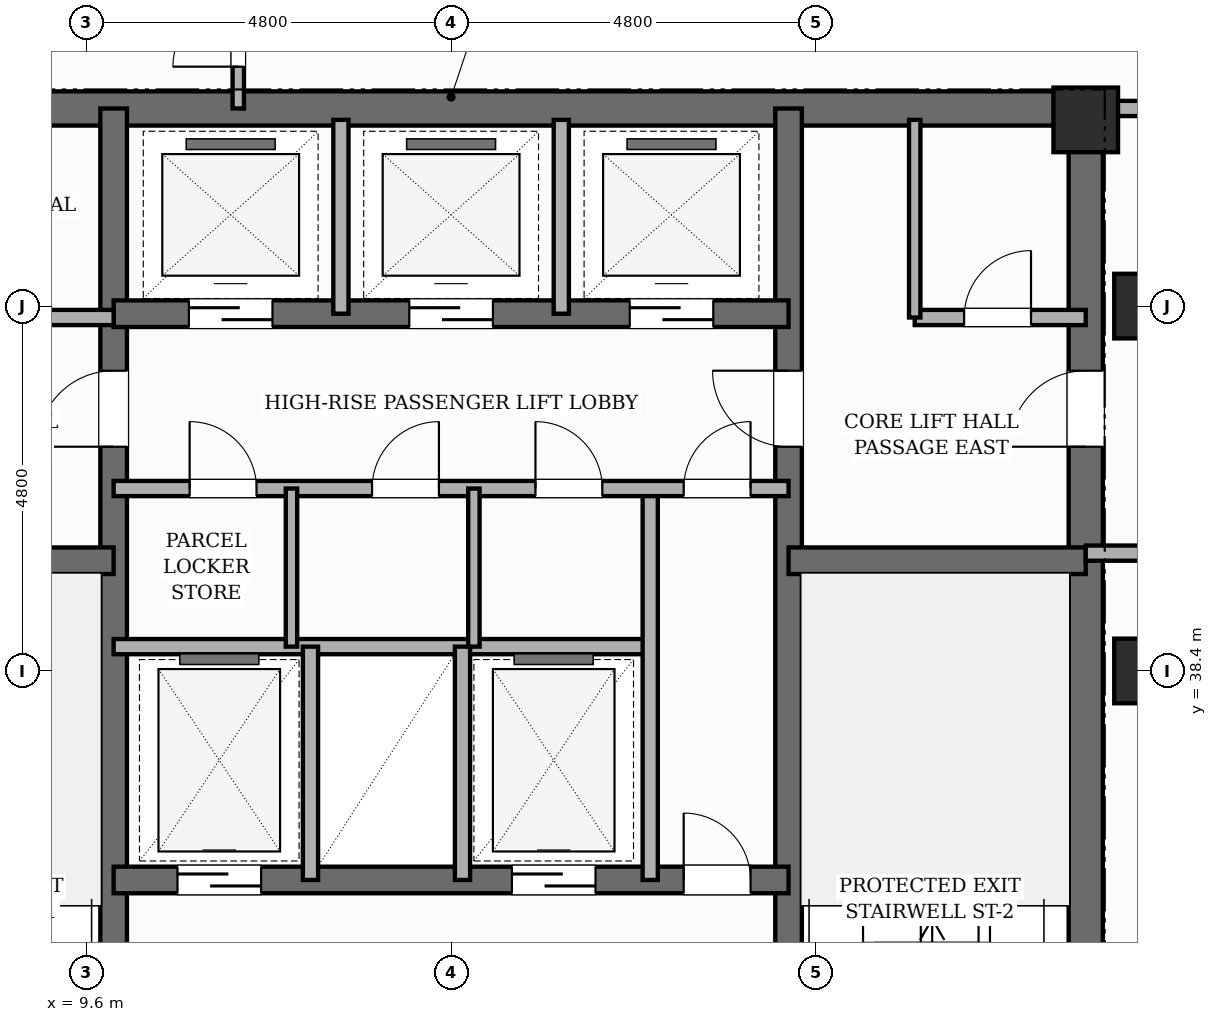
"""IFC4 building model, lengths in metres.
Left out: names, types, materials, properties, quantities, classifications, styles, units other than length and angle.
Written with IfcOpenShell. Run it as: python <this file> out.ifc"""

import sys

from ifc_helpers import new_model, si_unit, direction, frame, frame_2d, origin, origin_2d, place, context, subcontext, project, spatial, rectangle, extrude, element, fill, save


model = new_model("IFC4")
c1 = context("Model", 3, precision=1e-05, world=origin(), true_north=direction((0.0, 1.0)))
c2 = subcontext(c1, "Body", "Model", "MODEL_VIEW")
j1 = project(units=[si_unit("LENGTHUNIT", "METRE"), si_unit("PLANEANGLEUNIT", "RADIAN")], contexts=[c1])
p1 = place(None, origin())
s1 = spatial("IfcSite", under=j1, at=p1, CompositionType="ELEMENT")
p2 = place(p1, origin())
s2 = spatial("IfcBuilding", under=s1, at=p2, CompositionType="ELEMENT")
p3 = place(p2, frame((0.0, 0.0, 207.4)))
s3 = spatial("IfcBuildingStorey", under=s2, at=p3, CompositionType="ELEMENT", Elevation=207.4)
p4 = place(p3, frame((22.75, 30.675, 0.0), z_axis=(0.0, 0.0, 1.0), x_axis=(0.0, 1.0, 0.0)))
e1 = element("IfcWall", 1, at=p4, inside=s3, PredefinedType="SHEAR", context=c2, shape_type="SweptSolid", body=[
    extrude(rectangle(XDim=15.35, YDim=0.45, at=frame_2d((7.675, 0.0))), origin(), (0.0, 0.0, 1.0), 3.6),
])
p5 = place(p4, frame((10.675, 0.0, 0.0)))
e2 = element("IfcOpeningElement", 2, at=p5, cuts=e1, PredefinedType="OPENING", context=c2, shape_type="SweptSolid", body=[
    extrude(rectangle(XDim=1.0, YDim=2.15, at=frame_2d((0.5, 1.075))), frame((0.0, 0.235, 0.0), z_axis=(0.0, -1.0, 0.0), x_axis=(1.0, 0.0, 0.0)), (0.0, 0.0, 1.0), 0.47),
])
p6 = place(p3, frame((6.05, 45.8, 0.0), z_axis=(0.0, 0.0, 1.0), x_axis=(1.0, 0.0, 0.0)))
e3 = element("IfcWall", 3, at=p6, inside=s3, PredefinedType="SHEAR", context=c2, shape_type="SweptSolid", body=[
    extrude(rectangle(XDim=16.7, YDim=0.45, at=frame_2d((8.35, 0.0))), origin(), (0.0, 0.0, 1.0), 3.6),
])
p7 = place(p3, frame((9.96, 30.9, 0.0), z_axis=(0.0, 0.0, 1.0), x_axis=(0.0, 1.0, 0.0)))
e4 = element("IfcWall", 4, at=p7, inside=s3, PredefinedType="SHEAR", context=c2, shape_type="SweptSolid", body=[
    extrude(rectangle(XDim=14.9, YDim=0.35, at=frame_2d((7.45, 0.0))), origin(), (0.0, 0.0, 1.0), 3.6),
])
p8 = place(p7, frame((0.65, 0.0, 0.0)))
e5 = element("IfcOpeningElement", 5, at=p8, cuts=e4, PredefinedType="OPENING", context=c2, shape_type="SweptSolid", body=[
    extrude(rectangle(XDim=0.95, YDim=2.1, at=frame_2d((0.475, 1.05))), frame((0.0, 0.185, 0.0), z_axis=(0.0, -1.0, 0.0), x_axis=(1.0, 0.0, 0.0)), (0.0, 0.0, 1.0), 0.37),
])
p9 = place(p7, frame((10.45, 0.0, 0.0)))
e6 = element("IfcOpeningElement", 6, at=p9, cuts=e4, PredefinedType="OPENING", context=c2, shape_type="SweptSolid", body=[
    extrude(rectangle(XDim=1.0, YDim=2.15, at=frame_2d((0.5, 1.075))), frame((0.0, 0.185, 0.0), z_axis=(0.0, -1.0, 0.0), x_axis=(1.0, 0.0, 0.0)), (0.0, 0.0, 1.0), 0.37),
])
p10 = place(p3, frame((18.84, 30.9, 0.0), z_axis=(0.0, 0.0, 1.0), x_axis=(0.0, 1.0, 0.0)))
e7 = element("IfcWall", 7, at=p10, inside=s3, PredefinedType="SHEAR", context=c2, shape_type="SweptSolid", body=[
    extrude(rectangle(XDim=14.9, YDim=0.35, at=frame_2d((7.45, 0.0))), origin(), (0.0, 0.0, 1.0), 3.6),
])
p11 = place(p10, frame((0.65, 0.0, 0.0)))
e8 = element("IfcOpeningElement", 8, at=p11, cuts=e7, PredefinedType="OPENING", context=c2, shape_type="SweptSolid", body=[
    extrude(rectangle(XDim=0.95, YDim=2.1, at=frame_2d((0.475, 1.05))), frame((0.0, 0.185, 0.0), z_axis=(0.0, -1.0, 0.0), x_axis=(1.0, 0.0, 0.0)), (0.0, 0.0, 1.0), 0.37),
])
p12 = place(p10, frame((10.45, 0.0, 0.0)))
e9 = element("IfcOpeningElement", 9, at=p12, cuts=e7, PredefinedType="OPENING", context=c2, shape_type="SweptSolid", body=[
    extrude(rectangle(XDim=1.0, YDim=2.15, at=frame_2d((0.5, 1.075))), frame((0.0, 0.185, 0.0), z_axis=(0.0, -1.0, 0.0), x_axis=(1.0, 0.0, 0.0)), (0.0, 0.0, 1.0), 0.37),
])
for number, where, z_axis, x_axis in (
    (10, (6.05, 39.85, 0.0), (0.0, 0.0, 1.0), (1.0, 0.0, 0.0)),
    (11, (18.84, 39.85, 0.0), (0.0, 0.0, 1.0), (1.0, 0.0, 0.0)),
):
    element("IfcWall", number, at=place(p3, frame(where, z_axis=z_axis, x_axis=x_axis)), inside=s3, PredefinedType="SHEAR", context=c2, shape_type="SweptSolid", body=[
        extrude(rectangle(XDim=3.91, YDim=0.35, at=frame_2d((1.955, 0.0))), origin(), (0.0, 0.0, 1.0), 3.6),
    ])
p13 = place(p3, frame((9.96, 35.65, 0.0), z_axis=(0.0, 0.0, 1.0), x_axis=(1.0, 0.0, 0.0)))
e12 = element("IfcWall", 12, at=p13, inside=s3, PredefinedType="SHEAR", context=c2, shape_type="SweptSolid", body=[
    extrude(rectangle(XDim=8.88, YDim=0.35, at=frame_2d((4.44, 0.0))), origin(), (0.0, 0.0, 1.0), 3.6),
])
p14 = place(p13, frame((0.84, 0.0, 0.0)))
e13 = element("IfcOpeningElement", 13, at=p14, cuts=e12, PredefinedType="OPENING", context=c2, shape_type="SweptSolid", body=[
    extrude(rectangle(XDim=1.1, YDim=2.15, at=frame_2d((0.55, 1.075))), frame((0.0, 0.185, 0.0), z_axis=(0.0, -1.0, 0.0), x_axis=(1.0, 0.0, 0.0)), (0.0, 0.0, 1.0), 0.37),
])
p15 = place(p13, frame((5.24, 0.0, 0.0)))
e14 = element("IfcOpeningElement", 14, at=p15, cuts=e12, PredefinedType="OPENING", context=c2, shape_type="SweptSolid", body=[
    extrude(rectangle(XDim=1.1, YDim=2.15, at=frame_2d((0.55, 1.075))), frame((0.0, 0.185, 0.0), z_axis=(0.0, -1.0, 0.0), x_axis=(1.0, 0.0, 0.0)), (0.0, 0.0, 1.0), 0.37),
])
p16 = place(p13, frame((7.5, 0.0, 0.0)))
e15 = element("IfcOpeningElement", 15, at=p16, cuts=e12, PredefinedType="OPENING", context=c2, shape_type="SweptSolid", body=[
    extrude(rectangle(XDim=0.88, YDim=2.1, at=frame_2d((0.44, 1.05))), frame((0.0, 0.185, 0.0), z_axis=(0.0, -1.0, 0.0), x_axis=(1.0, 0.0, 0.0)), (0.0, 0.0, 1.0), 0.37),
])
p17 = place(p3, frame((9.96, 43.1, 0.0), z_axis=(0.0, 0.0, 1.0), x_axis=(1.0, 0.0, 0.0)))
e16 = element("IfcWall", 16, at=p17, inside=s3, PredefinedType="SHEAR", context=c2, shape_type="SweptSolid", body=[
    extrude(rectangle(XDim=8.88, YDim=0.35, at=frame_2d((4.44, 0.0))), origin(), (0.0, 0.0, 1.0), 3.6),
])
p18 = place(p17, frame((0.99, 0.0, 0.0)))
e17 = element("IfcOpeningElement", 17, at=p18, cuts=e16, PredefinedType="OPENING", context=c2, shape_type="SweptSolid", body=[
    extrude(rectangle(XDim=1.1, YDim=2.15, at=frame_2d((0.55, 1.075))), frame((0.0, 0.185, 0.0), z_axis=(0.0, -1.0, 0.0), x_axis=(1.0, 0.0, 0.0)), (0.0, 0.0, 1.0), 0.37),
])
p19 = place(p17, frame((3.89, 0.0, 0.0)))
e18 = element("IfcOpeningElement", 18, at=p19, cuts=e16, PredefinedType="OPENING", context=c2, shape_type="SweptSolid", body=[
    extrude(rectangle(XDim=1.1, YDim=2.15, at=frame_2d((0.55, 1.075))), frame((0.0, 0.185, 0.0), z_axis=(0.0, -1.0, 0.0), x_axis=(1.0, 0.0, 0.0)), (0.0, 0.0, 1.0), 0.37),
])
p20 = place(p17, frame((6.79, 0.0, 0.0)))
e19 = element("IfcOpeningElement", 19, at=p20, cuts=e16, PredefinedType="OPENING", context=c2, shape_type="SweptSolid", body=[
    extrude(rectangle(XDim=1.1, YDim=2.15, at=frame_2d((0.55, 1.075))), frame((0.0, 0.185, 0.0), z_axis=(0.0, -1.0, 0.0), x_axis=(1.0, 0.0, 0.0)), (0.0, 0.0, 1.0), 0.37),
])
for number, where, z_axis, x_axis in (
    (20, (22.75, 45.65, 0.0), (0.0, 0.0, 1.0), (1.0, 0.0, 0.0)),
    (21, (23.55, 38.4, 0.0), (0.0, 0.0, 1.0), (1.0, 0.0, 0.0)),
    (22, (23.55, 43.2, 0.0), (0.0, 0.0, 1.0), (1.0, 0.0, 0.0)),
):
    element("IfcColumn", number, at=place(p3, frame(where, z_axis=z_axis, x_axis=x_axis)), inside=s3, PredefinedType="COLUMN", context=c2, shape_type="SweptSolid", body=[
        extrude(rectangle(XDim=0.85, YDim=0.85, at=origin_2d()), origin(), (0.0, 0.0, 1.0), 3.6),
    ])
p21 = place(p3, frame((9.96, 38.72, 0.0), z_axis=(0.0, 0.0, 1.0), x_axis=(1.0, 0.0, 0.0)))
e23 = element("IfcWall", 23, at=p21, inside=s3, PredefinedType="POLYGONAL", context=c2, shape_type="SweptSolid", body=[
    extrude(rectangle(XDim=7.06, YDim=0.2, at=frame_2d((3.53, 0.0))), origin(), (0.0, 0.0, 1.0), 3.38),
])
for number, where, z_axis, x_axis in (
    (24, (12.55, 35.65, 0.0), (0.0, 0.0, 1.0), (0.0, 1.0, 0.0)),
    (25, (14.55, 35.65, 0.0), (0.0, 0.0, 1.0), (0.0, 1.0, 0.0)),
):
    element("IfcWall", number, at=place(p3, frame(where, z_axis=z_axis, x_axis=x_axis)), inside=s3, PredefinedType="POLYGONAL", context=c2, shape_type="SweptSolid", body=[
        extrude(rectangle(XDim=3.07, YDim=0.2, at=frame_2d((1.535, 0.0))), origin(), (0.0, 0.0, 1.0), 3.38),
    ])
p22 = place(p3, frame((17.02, 35.65, 0.0), z_axis=(0.0, 0.0, 1.0), x_axis=(0.0, 1.0, 0.0)))
e26 = element("IfcWall", 26, at=p22, inside=s3, PredefinedType="POLYGONAL", context=c2, shape_type="SweptSolid", body=[
    extrude(rectangle(XDim=5.15, YDim=0.2, at=frame_2d((2.575, 0.0))), origin(), (0.0, 0.0, 1.0), 3.38),
])
p23 = place(p3, frame((9.96, 40.8, 0.0), z_axis=(0.0, 0.0, 1.0), x_axis=(1.0, 0.0, 0.0)))
e27 = element("IfcWall", 27, at=p23, inside=s3, PredefinedType="POLYGONAL", context=c2, shape_type="SweptSolid", body=[
    extrude(rectangle(XDim=8.88, YDim=0.2, at=frame_2d((4.44, 0.0))), origin(), (0.0, 0.0, 1.0), 3.38),
])
p24 = place(p23, frame((7.5, 0.0, 0.0)))
e28 = element("IfcOpeningElement", 28, at=p24, cuts=e27, PredefinedType="OPENING", context=c2, shape_type="SweptSolid", body=[
    extrude(rectangle(XDim=0.88, YDim=2.1, at=frame_2d((0.44, 1.05))), frame((0.0, 0.11, 0.0), z_axis=(0.0, -1.0, 0.0), x_axis=(1.0, 0.0, 0.0)), (0.0, 0.0, 1.0), 0.22),
])
p25 = place(p23, frame((1.0, 0.0, 0.0)))
e29 = element("IfcOpeningElement", 29, at=p25, cuts=e27, PredefinedType="OPENING", context=c2, shape_type="SweptSolid", body=[
    extrude(rectangle(XDim=0.88, YDim=2.1, at=frame_2d((0.44, 1.05))), frame((0.0, 0.11, 0.0), z_axis=(0.0, -1.0, 0.0), x_axis=(1.0, 0.0, 0.0)), (0.0, 0.0, 1.0), 0.22),
])
p26 = place(p23, frame((3.4, 0.0, 0.0)))
e30 = element("IfcOpeningElement", 30, at=p26, cuts=e27, PredefinedType="OPENING", context=c2, shape_type="SweptSolid", body=[
    extrude(rectangle(XDim=0.88, YDim=2.1, at=frame_2d((0.44, 1.05))), frame((0.0, 0.11, 0.0), z_axis=(0.0, -1.0, 0.0), x_axis=(1.0, 0.0, 0.0)), (0.0, 0.0, 1.0), 0.22),
])
p27 = place(p23, frame((5.55, 0.0, 0.0)))
e31 = element("IfcOpeningElement", 31, at=p27, cuts=e27, PredefinedType="OPENING", context=c2, shape_type="SweptSolid", body=[
    extrude(rectangle(XDim=0.88, YDim=2.1, at=frame_2d((0.44, 1.05))), frame((0.0, 0.11, 0.0), z_axis=(0.0, -1.0, 0.0), x_axis=(1.0, 0.0, 0.0)), (0.0, 0.0, 1.0), 0.22),
])
p28 = place(p3, frame((20.5, 43.05, 0.0), z_axis=(0.0, 0.0, 1.0), x_axis=(1.0, 0.0, 0.0)))
e32 = element("IfcWall", 32, at=p28, inside=s3, PredefinedType="POLYGONAL", context=c2, shape_type="SweptSolid", body=[
    extrude(rectangle(XDim=2.25, YDim=0.2, at=frame_2d((1.125, 0.0))), origin(), (0.0, 0.0, 1.0), 2.66),
])
p29 = place(p28, frame((0.65, 0.0, 0.0)))
e33 = element("IfcOpeningElement", 33, at=p29, cuts=e32, PredefinedType="OPENING", context=c2, shape_type="SweptSolid", body=[
    extrude(rectangle(XDim=0.88, YDim=2.1, at=frame_2d((0.44, 1.05))), frame((0.0, 0.11, 0.0), z_axis=(0.0, -1.0, 0.0), x_axis=(1.0, 0.0, 0.0)), (0.0, 0.0, 1.0), 0.22),
])
p30 = place(p3, frame((6.05, 43.05, 0.0), z_axis=(0.0, 0.0, 1.0), x_axis=(1.0, 0.0, 0.0)))
e34 = element("IfcWall", 34, at=p30, inside=s3, PredefinedType="POLYGONAL", context=c2, shape_type="SweptSolid", body=[
    extrude(rectangle(XDim=3.91, YDim=0.2, at=frame_2d((1.955, 0.0))), origin(), (0.0, 0.0, 1.0), 2.66),
])
p31 = place(p30, frame((1.35, 0.0, 0.0)))
e35 = element("IfcOpeningElement", 35, at=p31, cuts=e34, PredefinedType="OPENING", context=c2, shape_type="SweptSolid", body=[
    extrude(rectangle(XDim=0.88, YDim=2.1, at=frame_2d((0.44, 1.05))), frame((0.0, 0.11, 0.0), z_axis=(0.0, -1.0, 0.0), x_axis=(1.0, 0.0, 0.0)), (0.0, 0.0, 1.0), 0.22),
])
for number, where, z_axis, x_axis in (
    (36, (12.95, 43.1, 0.0), (0.0, 0.0, 1.0), (0.0, 1.0, 0.0)),
    (37, (15.85, 43.1, 0.0), (0.0, 0.0, 1.0), (0.0, 1.0, 0.0)),
):
    element("IfcWall", number, at=place(p3, frame(where, z_axis=z_axis, x_axis=x_axis)), inside=s3, PredefinedType="POLYGONAL", context=c2, shape_type="SweptSolid", body=[
        extrude(rectangle(XDim=2.55, YDim=0.2, at=frame_2d((1.275, 0.0))), origin(), (0.0, 0.0, 1.0), 3.38),
    ])
for number, where, z_axis, x_axis in (
    (38, (12.3, 38.72, 0.0), (0.0, 0.0, 1.0), (0.0, 1.0, 0.0)),
    (39, (14.7, 38.72, 0.0), (0.0, 0.0, 1.0), (0.0, 1.0, 0.0)),
):
    element("IfcWall", number, at=place(p3, frame(where, z_axis=z_axis, x_axis=x_axis)), inside=s3, PredefinedType="PARTITIONING", context=c2, shape_type="SweptSolid", body=[
        extrude(rectangle(XDim=2.08, YDim=0.15, at=frame_2d((1.04, 0.0))), origin(), (0.0, 0.0, 1.0), 3.38),
    ])
p32 = place(p3, frame((20.5, 43.05, 0.0), z_axis=(0.0, 0.0, 1.0), x_axis=(0.0, 1.0, 0.0)))
e40 = element("IfcWall", 40, at=p32, inside=s3, PredefinedType="PARTITIONING", context=c2, shape_type="SweptSolid", body=[
    extrude(rectangle(XDim=2.6, YDim=0.15, at=frame_2d((1.3, 0.0))), origin(), (0.0, 0.0, 1.0), 3.38),
])
p33 = place(p3, frame((22.75, 45.8, 0.0), z_axis=(0.0, 0.0, 1.0), x_axis=(1.0, 0.0, 0.0)))
e41 = element("IfcWall", 41, at=p33, inside=s3, PredefinedType="PARTITIONING", context=c2, shape_type="SweptSolid", body=[
    extrude(rectangle(XDim=2.75, YDim=0.2, at=frame_2d((1.375, 0.0))), origin(), (0.0, 0.0, 1.0), 3.38),
])
p34 = place(p3, frame((11.6, 45.8, 0.0), z_axis=(0.0, 0.0, 1.0), x_axis=(0.0, 1.0, 0.0)))
e42 = element("IfcWall", 42, at=p34, inside=s3, PredefinedType="PARTITIONING", context=c2, shape_type="SweptSolid", body=[
    extrude(rectangle(XDim=1.92, YDim=0.15, at=frame_2d((0.96, 0.0))), origin(), (0.0, 0.0, 1.0), 3.38),
])
p35 = place(p34, frame((0.55, 0.0, 0.0)))
e43 = element("IfcOpeningElement", 43, at=p35, cuts=e42, PredefinedType="OPENING", context=c2, shape_type="SweptSolid", body=[
    extrude(rectangle(XDim=0.86, YDim=2.1, at=frame_2d((0.43, 1.05))), frame((0.0, 0.085, 0.0), z_axis=(0.0, -1.0, 0.0), x_axis=(1.0, 0.0, 0.0)), (0.0, 0.0, 1.0), 0.17),
])
p36 = place(p3, frame((22.75, 39.95, 0.0), z_axis=(0.0, 0.0, 1.0), x_axis=(1.0, 0.0, 0.0)))
e44 = element("IfcWall", 44, at=p36, inside=s3, PredefinedType="PARTITIONING", context=c2, shape_type="SweptSolid", body=[
    extrude(rectangle(XDim=2.75, YDim=0.2, at=frame_2d((1.375, 0.0))), origin(), (0.0, 0.0, 1.0), 3.38),
])
p37 = place(p14, origin())
e45 = element("IfcDoor", 45, at=p37, inside=s3, OperationType="SLIDING_TO_LEFT", PredefinedType="DOOR", context=c2, shape_type="SweptSolid", body=[
    extrude(rectangle(XDim=1.1, YDim=2.15, at=frame_2d((0.55, 1.075))), frame((0.0, 0.025, 0.0), z_axis=(0.0, -1.0, 0.0), x_axis=(1.0, 0.0, 0.0)), (0.0, 0.0, 1.0), 0.05),
])
fill(e13, e45)
p38 = place(p15, origin())
e46 = element("IfcDoor", 46, at=p38, inside=s3, OperationType="SLIDING_TO_RIGHT", PredefinedType="DOOR", context=c2, shape_type="SweptSolid", body=[
    extrude(rectangle(XDim=1.1, YDim=2.15, at=frame_2d((0.55, 1.075))), frame((0.0, 0.025, 0.0), z_axis=(0.0, -1.0, 0.0), x_axis=(1.0, 0.0, 0.0)), (0.0, 0.0, 1.0), 0.05),
])
fill(e14, e46)
p39 = place(p16, origin())
e47 = element("IfcDoor", 47, at=p39, inside=s3, OperationType="SINGLE_SWING_LEFT", PredefinedType="DOOR", context=c2, shape_type="SweptSolid", body=[
    extrude(rectangle(XDim=0.88, YDim=2.1, at=frame_2d((0.44, 1.05))), frame((0.0, 0.025, 0.0), z_axis=(0.0, -1.0, 0.0), x_axis=(1.0, 0.0, 0.0)), (0.0, 0.0, 1.0), 0.05),
])
fill(e15, e47)
p40 = place(p24, origin())
e48 = element("IfcDoor", 48, at=p40, inside=s3, OperationType="SINGLE_SWING_RIGHT", PredefinedType="DOOR", context=c2, shape_type="SweptSolid", body=[
    extrude(rectangle(XDim=0.88, YDim=2.1, at=frame_2d((0.44, 1.05))), frame((0.0, 0.025, 0.0), z_axis=(0.0, -1.0, 0.0), x_axis=(1.0, 0.0, 0.0)), (0.0, 0.0, 1.0), 0.05),
])
fill(e28, e48)
p41 = place(p18, origin())
e49 = element("IfcDoor", 49, at=p41, inside=s3, OperationType="SLIDING_TO_LEFT", PredefinedType="DOOR", context=c2, shape_type="SweptSolid", body=[
    extrude(rectangle(XDim=1.1, YDim=2.15, at=frame_2d((0.55, 1.075))), frame((0.0, 0.025, 0.0), z_axis=(0.0, -1.0, 0.0), x_axis=(1.0, 0.0, 0.0)), (0.0, 0.0, 1.0), 0.05),
])
fill(e17, e49)
p42 = place(p19, origin())
e50 = element("IfcDoor", 50, at=p42, inside=s3, OperationType="SLIDING_TO_RIGHT", PredefinedType="DOOR", context=c2, shape_type="SweptSolid", body=[
    extrude(rectangle(XDim=1.1, YDim=2.15, at=frame_2d((0.55, 1.075))), frame((0.0, 0.025, 0.0), z_axis=(0.0, -1.0, 0.0), x_axis=(1.0, 0.0, 0.0)), (0.0, 0.0, 1.0), 0.05),
])
fill(e18, e50)
p43 = place(p20, origin())
e51 = element("IfcDoor", 51, at=p43, inside=s3, OperationType="SLIDING_TO_LEFT", PredefinedType="DOOR", context=c2, shape_type="SweptSolid", body=[
    extrude(rectangle(XDim=1.1, YDim=2.15, at=frame_2d((0.55, 1.075))), frame((0.0, 0.025, 0.0), z_axis=(0.0, -1.0, 0.0), x_axis=(1.0, 0.0, 0.0)), (0.0, 0.0, 1.0), 0.05),
])
fill(e19, e51)
p44 = place(p9, origin())
e52 = element("IfcDoor", 52, at=p44, inside=s3, OperationType="SINGLE_SWING_LEFT", PredefinedType="DOOR", context=c2, shape_type="SweptSolid", body=[
    extrude(rectangle(XDim=1.0, YDim=2.15, at=frame_2d((0.5, 1.075))), frame((0.0, 0.025, 0.0), z_axis=(0.0, -1.0, 0.0), x_axis=(1.0, 0.0, 0.0)), (0.0, 0.0, 1.0), 0.05),
])
fill(e6, e52)
p45 = place(p12, origin())
e53 = element("IfcDoor", 53, at=p45, inside=s3, OperationType="SINGLE_SWING_RIGHT", PredefinedType="DOOR", context=c2, shape_type="SweptSolid", body=[
    extrude(rectangle(XDim=1.0, YDim=2.15, at=frame_2d((0.5, 1.075))), frame((0.0, 0.025, 0.0), z_axis=(0.0, -1.0, 0.0), x_axis=(1.0, 0.0, 0.0)), (0.0, 0.0, 1.0), 0.05),
])
fill(e9, e53)
p46 = place(p5, origin())
e54 = element("IfcDoor", 54, at=p46, inside=s3, OperationType="SINGLE_SWING_LEFT", PredefinedType="DOOR", context=c2, shape_type="SweptSolid", body=[
    extrude(rectangle(XDim=1.0, YDim=2.15, at=frame_2d((0.5, 1.075))), frame((0.0, 0.025, 0.0), z_axis=(0.0, -1.0, 0.0), x_axis=(1.0, 0.0, 0.0)), (0.0, 0.0, 1.0), 0.05),
])
fill(e2, e54)
p47 = place(p25, origin())
e55 = element("IfcDoor", 55, at=p47, inside=s3, OperationType="SINGLE_SWING_LEFT", PredefinedType="DOOR", context=c2, shape_type="SweptSolid", body=[
    extrude(rectangle(XDim=0.88, YDim=2.1, at=frame_2d((0.44, 1.05))), frame((0.0, 0.025, 0.0), z_axis=(0.0, -1.0, 0.0), x_axis=(1.0, 0.0, 0.0)), (0.0, 0.0, 1.0), 0.05),
])
fill(e29, e55)
p48 = place(p26, origin())
e56 = element("IfcDoor", 56, at=p48, inside=s3, OperationType="SINGLE_SWING_RIGHT", PredefinedType="DOOR", context=c2, shape_type="SweptSolid", body=[
    extrude(rectangle(XDim=0.88, YDim=2.1, at=frame_2d((0.44, 1.05))), frame((0.0, 0.025, 0.0), z_axis=(0.0, -1.0, 0.0), x_axis=(1.0, 0.0, 0.0)), (0.0, 0.0, 1.0), 0.05),
])
fill(e30, e56)
p49 = place(p27, origin())
e57 = element("IfcDoor", 57, at=p49, inside=s3, OperationType="SINGLE_SWING_LEFT", PredefinedType="DOOR", context=c2, shape_type="SweptSolid", body=[
    extrude(rectangle(XDim=0.88, YDim=2.1, at=frame_2d((0.44, 1.05))), frame((0.0, 0.025, 0.0), z_axis=(0.0, -1.0, 0.0), x_axis=(1.0, 0.0, 0.0)), (0.0, 0.0, 1.0), 0.05),
])
fill(e31, e57)
p50 = place(p29, origin())
e58 = element("IfcDoor", 58, at=p50, inside=s3, OperationType="SINGLE_SWING_RIGHT", PredefinedType="DOOR", context=c2, shape_type="SweptSolid", body=[
    extrude(rectangle(XDim=0.88, YDim=2.1, at=frame_2d((0.44, 1.05))), frame((0.0, 0.025, 0.0), z_axis=(0.0, -1.0, 0.0), x_axis=(1.0, 0.0, 0.0)), (0.0, 0.0, 1.0), 0.05),
])
fill(e33, e58)
p51 = place(p35, origin())
e59 = element("IfcDoor", 59, at=p51, inside=s3, OperationType="SINGLE_SWING_LEFT", PredefinedType="DOOR", context=c2, shape_type="SweptSolid", body=[
    extrude(rectangle(XDim=0.86, YDim=2.1, at=frame_2d((0.43, 1.05))), frame((0.0, 0.025, 0.0), z_axis=(0.0, -1.0, 0.0), x_axis=(1.0, 0.0, 0.0)), (0.0, 0.0, 1.0), 0.05),
])
fill(e43, e59)
save(model, sys.argv[1])
